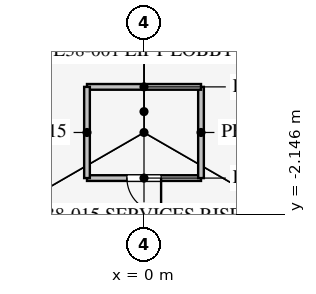
"""IFC4 building model, lengths in metres.
Left out: names, types, materials, properties, quantities, classifications, styles, units other than length and angle.
Written with IfcOpenShell. Run it as: python <this file> out.ifc"""

import sys

from ifc_helpers import new_model, si_unit, direction, frame, frame_2d, origin, place, context, subcontext, project, spatial, rectangle, extrude, element, fill, save


model = new_model("IFC4")
c1 = context("Model", 3, precision=1e-05, world=origin(), true_north=direction((0.0, 1.0)))
c2 = subcontext(c1, "Body", "Model", "MODEL_VIEW")
j1 = project(units=[si_unit("LENGTHUNIT", "METRE"), si_unit("PLANEANGLEUNIT", "RADIAN")], contexts=[c1])
p1 = place(None, origin())
s1 = spatial("IfcSite", under=j1, at=p1, CompositionType="ELEMENT")
p2 = place(p1, origin())
s2 = spatial("IfcBuilding", under=s1, at=p2, CompositionType="ELEMENT")
p3 = place(p2, frame((0.0, 0.0, 166.1)))
s3 = spatial("IfcBuildingStorey", under=s2, at=p3, CompositionType="ELEMENT", Elevation=166.1)
p4 = place(p3, frame((-1.5, -1.2, 0.0), z_axis=(0.0, 0.0, 1.0), x_axis=(1.0, 0.0, 0.0)))
e1 = element("IfcWall", 1, at=p4, inside=s3, PredefinedType="PARTITIONING", context=c2, shape_type="SweptSolid", body=[
    extrude(rectangle(XDim=3.0, YDim=0.15, at=frame_2d((1.5, 0.0))), origin(), (0.0, 0.0, 1.0), 4.0),
])
p5 = place(p4, frame((1.05, 0.0, 0.0)))
e2 = element("IfcOpeningElement", 2, at=p5, cuts=e1, PredefinedType="OPENING", context=c2, shape_type="SweptSolid", body=[
    extrude(rectangle(XDim=0.9, YDim=2.1, at=frame_2d((0.45, 1.05))), frame((0.0, 0.085, 0.0), z_axis=(0.0, -1.0, 0.0), x_axis=(1.0, 0.0, 0.0)), (0.0, 0.0, 1.0), 0.17),
])
p6 = place(p3, frame((1.5, -1.2, 0.0), z_axis=(0.0, 0.0, 1.0), x_axis=(0.0, 1.0, 0.0)))
e3 = element("IfcWall", 3, at=p6, inside=s3, PredefinedType="PARTITIONING", context=c2, shape_type="SweptSolid", body=[
    extrude(rectangle(XDim=2.4, YDim=0.15, at=frame_2d((1.2, 0.0))), origin(), (0.0, 0.0, 1.0), 4.0),
])
p7 = place(p3, frame((1.5, 1.2, 0.0), z_axis=(0.0, 0.0, 1.0), x_axis=(-1.0, 0.0, 0.0)))
e4 = element("IfcWall", 4, at=p7, inside=s3, PredefinedType="PARTITIONING", context=c2, shape_type="SweptSolid", body=[
    extrude(rectangle(XDim=3.0, YDim=0.15, at=frame_2d((1.5, 0.0))), origin(), (0.0, 0.0, 1.0), 4.0),
])
p8 = place(p3, frame((-1.5, 1.2, 0.0), z_axis=(0.0, 0.0, 1.0), x_axis=(0.0, -1.0, 0.0)))
e5 = element("IfcWall", 5, at=p8, inside=s3, PredefinedType="PARTITIONING", context=c2, shape_type="SweptSolid", body=[
    extrude(rectangle(XDim=2.4, YDim=0.15, at=frame_2d((1.2, 0.0))), origin(), (0.0, 0.0, 1.0), 4.0),
])
p9 = place(p3, frame((26.415, -15.231, 0.0), z_axis=(0.0, 0.0, 1.0), x_axis=(-0.50000091641, 0.866024874695, 0.0)))
e6 = element("IfcWall", 6, at=p9, inside=s3, PredefinedType="PARTITIONING", context=c2, shape_type="SweptSolid", body=[
    extrude(rectangle(XDim=52.796, YDim=0.12, at=frame_2d((26.398, 0.0))), origin(), (0.0, 0.0, 1.0), 2.9),
])
p10 = place(p9, frame((10.2, 0.0, 0.15)))
e7 = element("IfcOpeningElement", 7, at=p10, cuts=e6, PredefinedType="OPENING", context=c2, shape_type="SweptSolid", body=[
    extrude(rectangle(XDim=1.8, YDim=2.1, at=frame_2d((0.9, 1.05))), frame((0.0, 0.07, 0.0), z_axis=(0.0, -1.0, 0.0), x_axis=(1.0, 0.0, 0.0)), (0.0, 0.0, 1.0), 0.14),
])
p11 = place(p9, frame((40.8, 0.0, 0.15)))
e8 = element("IfcOpeningElement", 8, at=p11, cuts=e6, PredefinedType="OPENING", context=c2, shape_type="SweptSolid", body=[
    extrude(rectangle(XDim=1.8, YDim=2.1, at=frame_2d((0.9, 1.05))), frame((0.0, 0.07, 0.0), z_axis=(0.0, -1.0, 0.0), x_axis=(1.0, 0.0, 0.0)), (0.0, 0.0, 1.0), 0.14),
])
p12 = place(p3, frame((-0.016, 30.491, 0.0), z_axis=(0.0, 0.0, 1.0), x_axis=(-0.50000091641, -0.866024874695, 0.0)))
e9 = element("IfcWall", 9, at=p12, inside=s3, PredefinedType="PARTITIONING", context=c2, shape_type="SweptSolid", body=[
    extrude(rectangle(XDim=52.796, YDim=0.12, at=frame_2d((26.398, 0.0))), origin(), (0.0, 0.0, 1.0), 2.9),
])
p13 = place(p12, frame((10.2, 0.0, 0.15)))
e10 = element("IfcOpeningElement", 10, at=p13, cuts=e9, PredefinedType="OPENING", context=c2, shape_type="SweptSolid", body=[
    extrude(rectangle(XDim=1.8, YDim=2.1, at=frame_2d((0.9, 1.05))), frame((0.0, 0.07, 0.0), z_axis=(0.0, -1.0, 0.0), x_axis=(1.0, 0.0, 0.0)), (0.0, 0.0, 1.0), 0.14),
])
p14 = place(p12, frame((40.8, 0.0, 0.15)))
e11 = element("IfcOpeningElement", 11, at=p14, cuts=e9, PredefinedType="OPENING", context=c2, shape_type="SweptSolid", body=[
    extrude(rectangle(XDim=1.8, YDim=2.1, at=frame_2d((0.9, 1.05))), frame((0.0, 0.07, 0.0), z_axis=(0.0, -1.0, 0.0), x_axis=(1.0, 0.0, 0.0)), (0.0, 0.0, 1.0), 0.14),
])
p15 = place(p5, frame((0.9, 0.0, 0.0), z_axis=(0.0, 0.0, 1.0), x_axis=(-1.0, 0.0, 0.0)))
e12 = element("IfcDoor", 12, at=p15, inside=s3, OperationType="SINGLE_SWING_LEFT", PredefinedType="DOOR", context=c2, shape_type="SweptSolid", body=[
    extrude(rectangle(XDim=0.9, YDim=2.1, at=frame_2d((0.45, 1.05))), frame((0.0, 0.025, 0.0), z_axis=(0.0, -1.0, 0.0), x_axis=(1.0, 0.0, 0.0)), (0.0, 0.0, 1.0), 0.05),
])
fill(e2, e12)
save(model, sys.argv[1])
